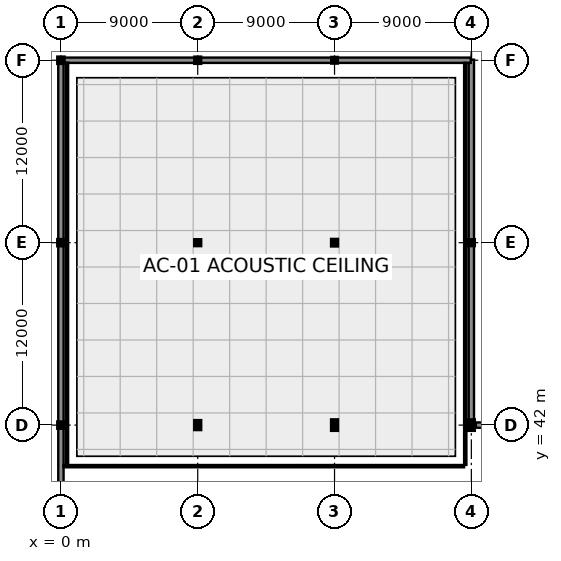
"""IFC4 building model, lengths in metres.
Left out: names, types, materials, properties, quantities, classifications, styles, units other than length and angle.
Written with IfcOpenShell. Run it as: python <this file> out.ifc"""

import sys

from ifc_helpers import new_model, si_unit, direction, frame, frame_2d, origin, origin_2d, place, context, subcontext, project, spatial, rectangle, hollow_circle, i_section, extrude, element, fill, save


model = new_model("IFC4")
c1 = context("Model", 3, precision=1e-05, world=origin(), true_north=direction((0.0, 1.0)))
c2 = subcontext(c1, "Body", "Model", "MODEL_VIEW")
j1 = project(units=[si_unit("LENGTHUNIT", "METRE"), si_unit("PLANEANGLEUNIT", "RADIAN")], contexts=[c1])
p1 = place(None, origin())
s1 = spatial("IfcSite", under=j1, at=p1, CompositionType="ELEMENT")
p2 = place(p1, origin())
s2 = spatial("IfcBuilding", under=s1, at=p2, CompositionType="ELEMENT")
p3 = place(p2, origin())
s3 = spatial("IfcBuildingStorey", under=s2, at=p3, CompositionType="ELEMENT", Elevation=0.0)
for number, where, z_axis, x_axis in (
    (1, (0.0, 42.0, 0.0), (0.0, 0.0, 1.0), (1.0, 0.0, 0.0)),
    (2, (0.0, 54.0, 0.0), (0.0, 0.0, 1.0), (1.0, 0.0, 0.0)),
    (3, (0.0, 66.0, 0.0), (0.0, 0.0, 1.0), (1.0, 0.0, 0.0)),
):
    element("IfcColumn", number, at=place(p3, frame(where, z_axis=z_axis, x_axis=x_axis)), inside=s3, PredefinedType="PILASTER", context=c2, shape_type="SweptSolid", body=[
        extrude(hollow_circle(Radius=0.162, WallThickness=0.012, at=origin_2d()), origin(), (0.0, 0.0, 1.0), 5.15),
    ])
p4 = place(p3, frame((9.0, 42.0, 0.0), z_axis=(0.0, 0.0, 1.0), x_axis=(1.0, 0.0, 0.0)))
e4 = element("IfcColumn", 4, at=p4, inside=s3, PredefinedType="COLUMN", context=c2, shape_type="SweptSolid", body=[
    extrude(i_section(OverallWidth=0.3, OverallDepth=0.5, WebThickness=0.014, FlangeThickness=0.028, at=origin_2d()), origin(), (0.0, 0.0, 1.0), 5.4),
])
p5 = place(p3, frame((9.0, 54.0, 0.0), z_axis=(0.0, 0.0, 1.0), x_axis=(0.0, 1.0, 0.0)))
e5 = element("IfcColumn", 5, at=p5, inside=s3, PredefinedType="COLUMN", context=c2, shape_type="SweptSolid", body=[
    extrude(i_section(OverallWidth=0.3, OverallDepth=0.3, WebThickness=0.011, FlangeThickness=0.019, at=origin_2d()), origin(), (0.0, 0.0, 1.0), 5.4),
])
p6 = place(p3, frame((9.0, 66.0, 0.0), z_axis=(0.0, 0.0, 1.0), x_axis=(1.0, 0.0, 0.0)))
e6 = element("IfcColumn", 6, at=p6, inside=s3, PredefinedType="COLUMN", context=c2, shape_type="SweptSolid", body=[
    extrude(i_section(OverallWidth=0.3, OverallDepth=0.32, WebThickness=0.011, FlangeThickness=0.021, at=origin_2d()), origin(), (0.0, 0.0, 1.0), 5.4),
])
p7 = place(p3, frame((18.0, 42.0, 0.0), z_axis=(0.0, 0.0, 1.0), x_axis=(1.0, 0.0, 0.0)))
e7 = element("IfcColumn", 7, at=p7, inside=s3, PredefinedType="COLUMN", context=c2, shape_type="SweptSolid", body=[
    extrude(i_section(OverallWidth=0.3, OverallDepth=0.6, WebThickness=0.015, FlangeThickness=0.03, at=origin_2d()), origin(), (0.0, 0.0, 1.0), 5.4),
])
p8 = place(p3, frame((18.0, 54.0, 0.0), z_axis=(0.0, 0.0, 1.0), x_axis=(1.0, 0.0, 0.0)))
e8 = element("IfcColumn", 8, at=p8, inside=s3, PredefinedType="COLUMN", context=c2, shape_type="SweptSolid", body=[
    extrude(i_section(OverallWidth=0.3, OverallDepth=0.34, WebThickness=0.012, FlangeThickness=0.021, at=origin_2d()), origin(), (0.0, 0.0, 1.0), 5.4),
])
p9 = place(p3, frame((18.0, 66.0, 0.0), z_axis=(0.0, 0.0, 1.0), x_axis=(1.0, 0.0, 0.0)))
e9 = element("IfcColumn", 9, at=p9, inside=s3, PredefinedType="COLUMN", context=c2, shape_type="SweptSolid", body=[
    extrude(i_section(OverallWidth=0.28, OverallDepth=0.28, WebThickness=0.01, FlangeThickness=0.018, at=origin_2d()), origin(), (0.0, 0.0, 1.0), 5.4),
])
p10 = place(p3, frame((27.0, 42.0, 0.0), z_axis=(0.0, 0.0, 1.0), x_axis=(0.0, 1.0, 0.0)))
e10 = element("IfcColumn", 10, at=p10, inside=s3, PredefinedType="COLUMN", context=c2, shape_type="SweptSolid", body=[
    extrude(i_section(OverallWidth=0.3, OverallDepth=0.6, WebThickness=0.015, FlangeThickness=0.03, at=origin_2d()), origin(), (0.0, 0.0, 1.0), 5.4),
])
p11 = place(p3, frame((27.0, 54.0, 0.0), z_axis=(0.0, 0.0, 1.0), x_axis=(1.0, 0.0, 0.0)))
e11 = element("IfcColumn", 11, at=p11, inside=s3, PredefinedType="COLUMN", context=c2, shape_type="SweptSolid", body=[
    extrude(i_section(OverallWidth=0.3, OverallDepth=0.3, WebThickness=0.011, FlangeThickness=0.019, at=origin_2d()), origin(), (0.0, 0.0, 1.0), 5.4),
])
p12 = place(p3, frame((35.992, 42.0, 0.0), z_axis=(0.0, 0.0, 1.0), x_axis=(-1.0, 0.0, 0.0)))
e12 = element("IfcWall", 12, at=p12, inside=s3, PredefinedType="SOLIDWALL", context=c2, shape_type="SweptSolid", body=[
    extrude(rectangle(XDim=8.694, YDim=0.35, at=frame_2d((4.347, 0.0))), origin(), (0.0, 0.0, 1.0), 4.555),
])
p13 = place(p12, frame((3.742, 0.0, 0.0)))
e13 = element("IfcOpeningElement", 13, at=p13, cuts=e12, PredefinedType="OPENING", context=c2, shape_type="SweptSolid", body=[
    extrude(rectangle(XDim=1.5, YDim=2.4, at=frame_2d((0.75, 1.2))), frame((0.0, 0.19, 0.0), z_axis=(0.0, -1.0, 0.0), x_axis=(1.0, 0.0, 0.0)), (0.0, 0.0, 1.0), 0.38),
])
p14 = place(p12, frame((1.634, 0.0, 0.5)))
e14 = element("IfcOpeningElement", 14, at=p14, cuts=e12, PredefinedType="OPENING", context=c2, shape_type="SweptSolid", body=[
    extrude(rectangle(XDim=1.6, YDim=2.8, at=frame_2d((0.8, 1.4))), frame((0.0, 0.19, 0.0), z_axis=(0.0, -1.0, 0.0), x_axis=(1.0, 0.0, 0.0)), (0.0, 0.0, 1.0), 0.38),
])
p15 = place(p3, frame((27.0, 42.008, 0.0), z_axis=(0.0, 0.0, 1.0), x_axis=(0.0, 1.0, 0.0)))
e15 = element("IfcWall", 15, at=p15, inside=s3, PredefinedType="SOLIDWALL", context=c2, shape_type="SweptSolid", body=[
    extrude(rectangle(XDim=11.844, YDim=0.35, at=frame_2d((5.922, 0.0))), origin(), (0.0, 0.0, 1.0), 4.505),
])
p16 = place(p15, frame((4.672, 0.0, 0.55)))
e16 = element("IfcOpeningElement", 16, at=p16, cuts=e15, PredefinedType="OPENING", context=c2, shape_type="SweptSolid", body=[
    extrude(rectangle(XDim=2.5, YDim=2.5, at=frame_2d((1.25, 1.25))), frame((0.0, 0.19, 0.0), z_axis=(0.0, -1.0, 0.0), x_axis=(1.0, 0.0, 0.0)), (0.0, 0.0, 1.0), 0.38),
])
p17 = place(p15, frame((3.053, 0.0, 0.85)))
e17 = element("IfcOpeningElement", 17, at=p17, cuts=e15, PredefinedType="OPENING", context=c2, shape_type="SweptSolid", body=[
    extrude(rectangle(XDim=1.0, YDim=2.2, at=frame_2d((0.5, 1.1))), frame((0.0, 0.19, 0.0), z_axis=(0.0, -1.0, 0.0), x_axis=(1.0, 0.0, 0.0)), (0.0, 0.0, 1.0), 0.38),
])
p18 = place(p3, frame((27.0, 54.148, 0.0), z_axis=(0.0, 0.0, 1.0), x_axis=(0.0, 1.0, 0.0)))
e18 = element("IfcWall", 18, at=p18, inside=s3, PredefinedType="SOLIDWALL", context=c2, shape_type="SweptSolid", body=[
    extrude(rectangle(XDim=11.892, YDim=0.35, at=frame_2d((5.946, 0.0))), origin(), (0.0, 0.0, 1.0), 5.08),
])
p19 = place(p18, frame((4.746, 0.0, 0.55)))
e19 = element("IfcOpeningElement", 19, at=p19, cuts=e18, PredefinedType="OPENING", context=c2, shape_type="SweptSolid", body=[
    extrude(rectangle(XDim=2.4, YDim=2.4, at=frame_2d((1.2, 1.2))), frame((0.0, 0.19, 0.0), z_axis=(0.0, -1.0, 0.0), x_axis=(1.0, 0.0, 0.0)), (0.0, 0.0, 1.0), 0.38),
])
p20 = place(p3, frame((26.96, 66.0, 0.0), z_axis=(0.0, 0.0, 1.0), x_axis=(-1.0, 0.0, 0.0)))
e20 = element("IfcWall", 20, at=p20, inside=s3, PredefinedType="SOLIDWALL", context=c2, shape_type="SweptSolid", body=[
    extrude(rectangle(XDim=8.952, YDim=0.35, at=frame_2d((4.476, 0.0))), origin(), (0.0, 0.0, 1.0), 4.245),
])
p21 = place(p20, frame((1.507, 0.0, 0.85)))
e21 = element("IfcOpeningElement", 21, at=p21, cuts=e20, PredefinedType="OPENING", context=c2, shape_type="SweptSolid", body=[
    extrude(rectangle(XDim=2.0, YDim=2.0, at=frame_2d((1.0, 1.0))), frame((0.0, 0.19, 0.0), z_axis=(0.0, -1.0, 0.0), x_axis=(1.0, 0.0, 0.0)), (0.0, 0.0, 1.0), 0.38),
])
p22 = place(p20, frame((5.445, 0.0, 0.85)))
e22 = element("IfcOpeningElement", 22, at=p22, cuts=e20, PredefinedType="OPENING", context=c2, shape_type="SweptSolid", body=[
    extrude(rectangle(XDim=2.0, YDim=2.0, at=frame_2d((1.0, 1.0))), frame((0.0, 0.19, 0.0), z_axis=(0.0, -1.0, 0.0), x_axis=(1.0, 0.0, 0.0)), (0.0, 0.0, 1.0), 0.38),
])
p23 = place(p3, frame((17.992, 66.0, 0.0), z_axis=(0.0, 0.0, 1.0), x_axis=(-1.0, 0.0, 0.0)))
e23 = element("IfcWall", 23, at=p23, inside=s3, PredefinedType="SOLIDWALL", context=c2, shape_type="SweptSolid", body=[
    extrude(rectangle(XDim=8.984, YDim=0.35, at=frame_2d((4.492, 0.0))), origin(), (0.0, 0.0, 1.0), 4.245),
])
p24 = place(p23, frame((3.392, 0.0, 0.0)))
e24 = element("IfcOpeningElement", 24, at=p24, cuts=e23, PredefinedType="OPENING", context=c2, shape_type="SweptSolid", body=[
    extrude(rectangle(XDim=2.2, YDim=2.5, at=frame_2d((1.1, 1.25))), frame((0.0, 0.19, 0.0), z_axis=(0.0, -1.0, 0.0), x_axis=(1.0, 0.0, 0.0)), (0.0, 0.0, 1.0), 0.38),
])
p25 = place(p3, frame((8.992, 66.0, 0.0), z_axis=(0.0, 0.0, 1.0), x_axis=(-1.0, 0.0, 0.0)))
e25 = element("IfcWall", 25, at=p25, inside=s3, PredefinedType="SOLIDWALL", context=c2, shape_type="SweptSolid", body=[
    extrude(rectangle(XDim=8.834, YDim=0.35, at=frame_2d((4.417, 0.0))), origin(), (0.0, 0.0, 1.0), 4.245),
])
p26 = place(p25, frame((1.474, 0.0, 0.85)))
e26 = element("IfcOpeningElement", 26, at=p26, cuts=e25, PredefinedType="OPENING", context=c2, shape_type="SweptSolid", body=[
    extrude(rectangle(XDim=2.0, YDim=2.0, at=frame_2d((1.0, 1.0))), frame((0.0, 0.19, 0.0), z_axis=(0.0, -1.0, 0.0), x_axis=(1.0, 0.0, 0.0)), (0.0, 0.0, 1.0), 0.38),
])
p27 = place(p25, frame((5.36, 0.0, 0.85)))
e27 = element("IfcOpeningElement", 27, at=p27, cuts=e25, PredefinedType="OPENING", context=c2, shape_type="SweptSolid", body=[
    extrude(rectangle(XDim=2.0, YDim=2.0, at=frame_2d((1.0, 1.0))), frame((0.0, 0.19, 0.0), z_axis=(0.0, -1.0, 0.0), x_axis=(1.0, 0.0, 0.0)), (0.0, 0.0, 1.0), 0.38),
])
p28 = place(p3, frame((0.0, 65.842, 0.0), z_axis=(0.0, 0.0, 1.0), x_axis=(0.0, -1.0, 0.0)))
e28 = element("IfcWall", 28, at=p28, inside=s3, PredefinedType="SOLIDWALL", context=c2, shape_type="SweptSolid", body=[
    extrude(rectangle(XDim=11.684, YDim=0.35, at=frame_2d((5.842, 0.0))), origin(), (0.0, 0.0, 1.0), 4.755),
])
p29 = place(p28, frame((4.742, 0.0, 0.85)))
e29 = element("IfcOpeningElement", 29, at=p29, cuts=e28, PredefinedType="OPENING", context=c2, shape_type="SweptSolid", body=[
    extrude(rectangle(XDim=2.2, YDim=2.2, at=frame_2d((1.1, 1.1))), frame((0.0, 0.19, 0.0), z_axis=(0.0, -1.0, 0.0), x_axis=(1.0, 0.0, 0.0)), (0.0, 0.0, 1.0), 0.38),
])
p30 = place(p28, frame((2.805, 0.0, 0.5)))
e30 = element("IfcOpeningElement", 30, at=p30, cuts=e28, PredefinedType="OPENING", context=c2, shape_type="SweptSolid", body=[
    extrude(rectangle(XDim=1.4, YDim=2.6, at=frame_2d((0.7, 1.3))), frame((0.0, 0.19, 0.0), z_axis=(0.0, -1.0, 0.0), x_axis=(1.0, 0.0, 0.0)), (0.0, 0.0, 1.0), 0.38),
])
p31 = place(p3, frame((0.0, 53.842, 0.0), z_axis=(0.0, 0.0, 1.0), x_axis=(0.0, -1.0, 0.0)))
e31 = element("IfcWall", 31, at=p31, inside=s3, PredefinedType="SOLIDWALL", context=c2, shape_type="SweptSolid", body=[
    extrude(rectangle(XDim=11.684, YDim=0.35, at=frame_2d((5.842, 0.0))), origin(), (0.0, 0.0, 1.0), 4.755),
])
p32 = place(p31, frame((2.222, 0.0, 0.85)))
e32 = element("IfcOpeningElement", 32, at=p32, cuts=e31, PredefinedType="OPENING", context=c2, shape_type="SweptSolid", body=[
    extrude(rectangle(XDim=2.1, YDim=2.1, at=frame_2d((1.05, 1.05))), frame((0.0, 0.19, 0.0), z_axis=(0.0, -1.0, 0.0), x_axis=(1.0, 0.0, 0.0)), (0.0, 0.0, 1.0), 0.38),
])
p33 = place(p31, frame((7.363, 0.0, 0.85)))
e33 = element("IfcOpeningElement", 33, at=p33, cuts=e31, PredefinedType="OPENING", context=c2, shape_type="SweptSolid", body=[
    extrude(rectangle(XDim=2.1, YDim=2.1, at=frame_2d((1.05, 1.05))), frame((0.0, 0.19, 0.0), z_axis=(0.0, -1.0, 0.0), x_axis=(1.0, 0.0, 0.0)), (0.0, 0.0, 1.0), 0.38),
])
p34 = place(p3, frame((0.0, 41.842, 0.0), z_axis=(0.0, 0.0, 1.0), x_axis=(0.0, -1.0, 0.0)))
e34 = element("IfcWall", 34, at=p34, inside=s3, PredefinedType="SOLIDWALL", context=c2, shape_type="SweptSolid", body=[
    extrude(rectangle(XDim=17.882, YDim=0.35, at=frame_2d((8.941, 0.0))), origin(), (0.0, 0.0, 1.0), 5.08),
])
p35 = place(p34, frame((7.641, 0.0, 0.0)))
e35 = element("IfcOpeningElement", 35, at=p35, cuts=e34, PredefinedType="OPENING", context=c2, shape_type="SweptSolid", body=[
    extrude(rectangle(XDim=2.6, YDim=2.6, at=frame_2d((1.3, 1.3))), frame((0.0, 0.19, 0.0), z_axis=(0.0, -1.0, 0.0), x_axis=(1.0, 0.0, 0.0)), (0.0, 0.0, 1.0), 0.38),
])
p36 = place(p3, frame((26.52, 39.3, 0.0), z_axis=(0.0, 0.0, 1.0), x_axis=(-1.0, 0.0, 0.0)))
e36 = element("IfcWall", 36, at=p36, inside=s3, PredefinedType="PARTITIONING", context=c2, shape_type="SweptSolid", body=[
    extrude(rectangle(XDim=26.35, YDim=0.15, at=frame_2d((13.175, 0.0))), origin(), (0.0, 0.0, 1.0), 5.04),
])
p37 = place(p36, frame((12.65, 0.0, 0.0)))
e37 = element("IfcOpeningElement", 37, at=p37, cuts=e36, PredefinedType="OPENING", context=c2, shape_type="SweptSolid", body=[
    extrude(rectangle(XDim=1.05, YDim=2.25, at=frame_2d((0.525, 1.125))), frame((0.0, 0.09, 0.0), z_axis=(0.0, -1.0, 0.0), x_axis=(1.0, 0.0, 0.0)), (0.0, 0.0, 1.0), 0.18),
])
p38 = place(p36, frame((24.3, 0.0, 1.05)))
e38 = element("IfcOpeningElement", 38, at=p38, cuts=e36, PredefinedType="OPENING", context=c2, shape_type="SweptSolid", body=[
    extrude(rectangle(XDim=1.2, YDim=1.0, at=frame_2d((0.6, 0.5))), frame((0.0, 0.09, 0.0), z_axis=(0.0, -1.0, 0.0), x_axis=(1.0, 0.0, 0.0)), (0.0, 0.0, 1.0), 0.18),
])
p39 = place(p3, frame((0.4, 39.37, 0.0), z_axis=(0.0, 0.0, 1.0), x_axis=(0.0, 1.0, 0.0)))
e39 = element("IfcWall", 39, at=p39, inside=s3, PredefinedType="PARTITIONING", context=c2, shape_type="SweptSolid", body=[
    extrude(rectangle(XDim=26.472, YDim=0.15, at=frame_2d((13.236, 0.0))), origin(), (0.0, 0.0, 1.0), 5.04),
])
p40 = place(p3, frame((26.6, 65.83, 0.0), z_axis=(0.0, 0.0, 1.0), x_axis=(0.0, -1.0, 0.0)))
e40 = element("IfcWall", 40, at=p40, inside=s3, PredefinedType="PARTITIONING", context=c2, shape_type="SweptSolid", body=[
    extrude(rectangle(XDim=26.45, YDim=0.15, at=frame_2d((13.225, 0.0))), origin(), (0.0, 0.0, 1.0), 5.04),
])
p41 = place(p24, frame((2.2, 0.0, 0.0), z_axis=(0.0, 0.0, 1.0), x_axis=(-1.0, 0.0, 0.0)))
e41 = element("IfcDoor", 41, at=p41, inside=s3, OperationType="DOUBLE_DOOR_SINGLE_SWING", PredefinedType="GATE", context=c2, shape_type="SweptSolid", body=[
    extrude(rectangle(XDim=2.2, YDim=2.5, at=frame_2d((1.1, 1.25))), frame((0.0, 0.025, 0.0), z_axis=(0.0, -1.0, 0.0), x_axis=(1.0, 0.0, 0.0)), (0.0, 0.0, 1.0), 0.05),
])
fill(e24, e41)
p42 = place(p16, origin())
e42 = element("IfcWindow", 42, at=p42, inside=s3, PartitioningType="SINGLE_PANEL", PredefinedType="WINDOW", context=c2, shape_type="SweptSolid", body=[
    extrude(rectangle(XDim=2.5, YDim=2.5, at=frame_2d((1.25, 1.25))), frame((0.0, 0.03, 0.0), z_axis=(0.0, -1.0, 0.0), x_axis=(1.0, 0.0, 0.0)), (0.0, 0.0, 1.0), 0.06),
])
fill(e16, e42)
p43 = place(p19, origin())
e43 = element("IfcWindow", 43, at=p43, inside=s3, PartitioningType="SINGLE_PANEL", PredefinedType="WINDOW", context=c2, shape_type="SweptSolid", body=[
    extrude(rectangle(XDim=2.4, YDim=2.4, at=frame_2d((1.2, 1.2))), frame((0.0, 0.03, 0.0), z_axis=(0.0, -1.0, 0.0), x_axis=(1.0, 0.0, 0.0)), (0.0, 0.0, 1.0), 0.06),
])
fill(e19, e43)
p44 = place(p21, origin())
e44 = element("IfcWindow", 44, at=p44, inside=s3, PartitioningType="SINGLE_PANEL", PredefinedType="WINDOW", context=c2, shape_type="SweptSolid", body=[
    extrude(rectangle(XDim=2.0, YDim=2.0, at=frame_2d((1.0, 1.0))), frame((0.0, 0.03, 0.0), z_axis=(0.0, -1.0, 0.0), x_axis=(1.0, 0.0, 0.0)), (0.0, 0.0, 1.0), 0.06),
])
fill(e21, e44)
p45 = place(p22, origin())
e45 = element("IfcWindow", 45, at=p45, inside=s3, PartitioningType="SINGLE_PANEL", PredefinedType="WINDOW", context=c2, shape_type="SweptSolid", body=[
    extrude(rectangle(XDim=2.0, YDim=2.0, at=frame_2d((1.0, 1.0))), frame((0.0, 0.03, 0.0), z_axis=(0.0, -1.0, 0.0), x_axis=(1.0, 0.0, 0.0)), (0.0, 0.0, 1.0), 0.06),
])
fill(e22, e45)
p46 = place(p26, origin())
e46 = element("IfcWindow", 46, at=p46, inside=s3, PartitioningType="SINGLE_PANEL", PredefinedType="WINDOW", context=c2, shape_type="SweptSolid", body=[
    extrude(rectangle(XDim=2.0, YDim=2.0, at=frame_2d((1.0, 1.0))), frame((0.0, 0.03, 0.0), z_axis=(0.0, -1.0, 0.0), x_axis=(1.0, 0.0, 0.0)), (0.0, 0.0, 1.0), 0.06),
])
fill(e26, e46)
p47 = place(p27, origin())
e47 = element("IfcWindow", 47, at=p47, inside=s3, PartitioningType="SINGLE_PANEL", PredefinedType="WINDOW", context=c2, shape_type="SweptSolid", body=[
    extrude(rectangle(XDim=2.0, YDim=2.0, at=frame_2d((1.0, 1.0))), frame((0.0, 0.03, 0.0), z_axis=(0.0, -1.0, 0.0), x_axis=(1.0, 0.0, 0.0)), (0.0, 0.0, 1.0), 0.06),
])
fill(e27, e47)
p48 = place(p29, origin())
e48 = element("IfcWindow", 48, at=p48, inside=s3, PartitioningType="SINGLE_PANEL", PredefinedType="WINDOW", context=c2, shape_type="SweptSolid", body=[
    extrude(rectangle(XDim=2.2, YDim=2.2, at=frame_2d((1.1, 1.1))), frame((0.0, 0.03, 0.0), z_axis=(0.0, -1.0, 0.0), x_axis=(1.0, 0.0, 0.0)), (0.0, 0.0, 1.0), 0.06),
])
fill(e29, e48)
p49 = place(p32, origin())
e49 = element("IfcWindow", 49, at=p49, inside=s3, PartitioningType="SINGLE_PANEL", PredefinedType="WINDOW", context=c2, shape_type="SweptSolid", body=[
    extrude(rectangle(XDim=2.1, YDim=2.1, at=frame_2d((1.05, 1.05))), frame((0.0, 0.03, 0.0), z_axis=(0.0, -1.0, 0.0), x_axis=(1.0, 0.0, 0.0)), (0.0, 0.0, 1.0), 0.06),
])
fill(e32, e49)
p50 = place(p33, origin())
e50 = element("IfcWindow", 50, at=p50, inside=s3, PartitioningType="SINGLE_PANEL", PredefinedType="WINDOW", context=c2, shape_type="SweptSolid", body=[
    extrude(rectangle(XDim=2.1, YDim=2.1, at=frame_2d((1.05, 1.05))), frame((0.0, 0.03, 0.0), z_axis=(0.0, -1.0, 0.0), x_axis=(1.0, 0.0, 0.0)), (0.0, 0.0, 1.0), 0.06),
])
fill(e33, e50)
p51 = place(p30, origin())
e51 = element("IfcWindow", 51, at=p51, inside=s3, PartitioningType="SINGLE_PANEL", PredefinedType="WINDOW", context=c2, shape_type="SweptSolid", body=[
    extrude(rectangle(XDim=1.4, YDim=2.6, at=frame_2d((0.7, 1.3))), frame((0.0, 0.03, 0.0), z_axis=(0.0, -1.0, 0.0), x_axis=(1.0, 0.0, 0.0)), (0.0, 0.0, 1.0), 0.06),
])
fill(e30, e51)
p52 = place(p17, origin())
e52 = element("IfcWindow", 52, at=p52, inside=s3, PartitioningType="SINGLE_PANEL", PredefinedType="WINDOW", context=c2, shape_type="SweptSolid", body=[
    extrude(rectangle(XDim=1.0, YDim=2.2, at=frame_2d((0.5, 1.1))), frame((0.0, 0.03, 0.0), z_axis=(0.0, -1.0, 0.0), x_axis=(1.0, 0.0, 0.0)), (0.0, 0.0, 1.0), 0.06),
])
fill(e17, e52)
p53 = place(p37, frame((1.05, 0.0, 0.0), z_axis=(0.0, 0.0, 1.0), x_axis=(-1.0, 0.0, 0.0)))
e53 = element("IfcDoor", 53, at=p53, inside=s3, OperationType="SINGLE_SWING_RIGHT", PredefinedType="DOOR", context=c2, shape_type="SweptSolid", body=[
    extrude(rectangle(XDim=1.05, YDim=2.25, at=frame_2d((0.525, 1.125))), frame((0.0, 0.025, 0.0), z_axis=(0.0, -1.0, 0.0), x_axis=(1.0, 0.0, 0.0)), (0.0, 0.0, 1.0), 0.05),
])
fill(e37, e53)
p54 = place(p38, origin())
e54 = element("IfcWindow", 54, at=p54, inside=s3, PartitioningType="SINGLE_PANEL", PredefinedType="WINDOW", context=c2, shape_type="SweptSolid", body=[
    extrude(rectangle(XDim=1.2, YDim=1.0, at=frame_2d((0.6, 0.5))), frame((0.0, 0.03, 0.0), z_axis=(0.0, -1.0, 0.0), x_axis=(1.0, 0.0, 0.0)), (0.0, 0.0, 1.0), 0.06),
])
fill(e38, e54)
save(model, sys.argv[1])
